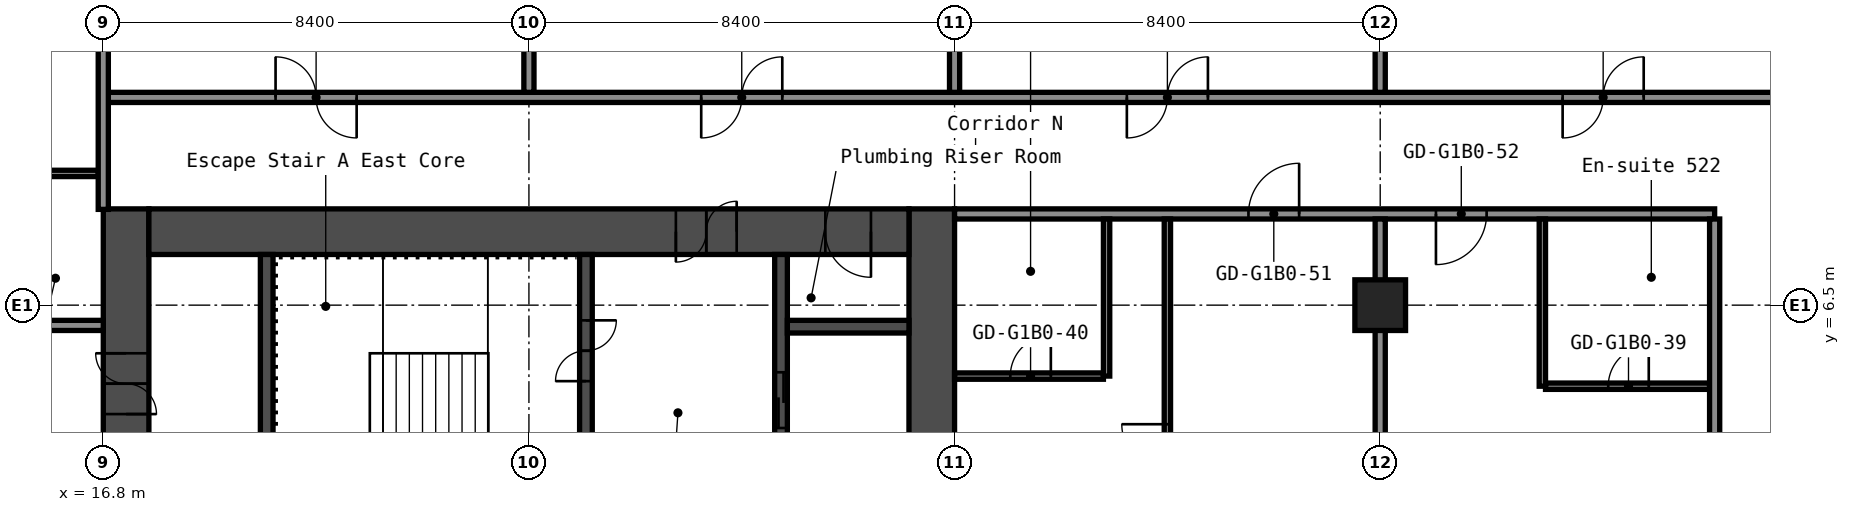
"""IFC4 building model, lengths in metres.
Left out: names, types, materials, properties, quantities, classifications, styles, units other than length and angle.
Written with IfcOpenShell. Run it as: python <this file> out.ifc"""

import sys

from ifc_helpers import new_model, si_unit, direction, frame, frame_2d, origin, origin_2d, place, context, subcontext, project, spatial, rectangle, hollow_rectangle, extrude, element, fill, save


model = new_model("IFC4")
c1 = context("Model", 3, precision=1e-05, world=origin(), true_north=direction((0.0, 1.0)))
c2 = subcontext(c1, "Body", "Model", "MODEL_VIEW")
j1 = project(units=[si_unit("LENGTHUNIT", "METRE"), si_unit("PLANEANGLEUNIT", "RADIAN")], contexts=[c1])
p1 = place(None, origin())
s1 = spatial("IfcSite", under=j1, at=p1, CompositionType="ELEMENT")
p2 = place(p1, origin())
s2 = spatial("IfcBuilding", under=s1, at=p2, CompositionType="ELEMENT")
p3 = place(p2, frame((0.0, 0.0, 23.0)))
s3 = spatial("IfcBuildingStorey", under=s2, at=p3, CompositionType="ELEMENT", Elevation=23.0)
p4 = place(p3, frame((42.0, 6.5, 0.0), z_axis=(0.0, 0.0, 1.0), x_axis=(1.0, 0.0, 0.0)))
e1 = element("IfcColumn", 1, at=p4, inside=s3, PredefinedType="COLUMN", context=c2, shape_type="SweptSolid", body=[
    extrude(hollow_rectangle(XDim=1.0, YDim=1.0, WallThickness=0.04, at=origin_2d()), origin(), (0.0, 0.0, 1.0), 2.8),
])
p5 = place(p3, frame((17.25, -8.4, 0.0), z_axis=(0.0, 0.0, 1.0), x_axis=(0.0, 1.0, 0.0)))
e2 = element("IfcWall", 2, at=p5, inside=s3, PredefinedType="SHEAR", context=c2, shape_type="SweptSolid", body=[
    extrude(rectangle(XDim=16.8, YDim=0.9, at=frame_2d((8.4, 0.0))), origin(), (0.0, 0.0, 1.0), 2.8),
])
p6 = place(p5, frame((12.75, 0.0, 0.0)))
e3 = element("IfcOpeningElement", 3, at=p6, cuts=e2, PredefinedType="OPENING", context=c2, shape_type="SweptSolid", body=[
    extrude(rectangle(XDim=1.2, YDim=2.1, at=frame_2d((0.6, 1.05))), frame((0.0, 0.46, 0.0), z_axis=(0.0, -1.0, 0.0), x_axis=(1.0, 0.0, 0.0)), (0.0, 0.0, 1.0), 0.92),
])
p7 = place(p5, frame((2.85, 0.0, 0.0)))
e4 = element("IfcOpeningElement", 4, at=p7, cuts=e2, PredefinedType="OPENING", context=c2, shape_type="SweptSolid", body=[
    extrude(rectangle(XDim=1.2, YDim=2.1, at=frame_2d((0.6, 1.05))), frame((0.0, 0.46, 0.0), z_axis=(0.0, -1.0, 0.0), x_axis=(1.0, 0.0, 0.0)), (0.0, 0.0, 1.0), 0.92),
])
p8 = place(p3, frame((33.15, -8.4, 0.0), z_axis=(0.0, 0.0, 1.0), x_axis=(0.0, 1.0, 0.0)))
e5 = element("IfcWall", 5, at=p8, inside=s3, PredefinedType="SHEAR", context=c2, shape_type="SweptSolid", body=[
    extrude(rectangle(XDim=16.8, YDim=0.9, at=frame_2d((8.4, 0.0))), origin(), (0.0, 0.0, 1.0), 2.8),
])
p9 = place(p3, frame((17.7, 7.95, 0.0), z_axis=(0.0, 0.0, 1.0), x_axis=(1.0, 0.0, 0.0)))
e6 = element("IfcWall", 6, at=p9, inside=s3, PredefinedType="SHEAR", context=c2, shape_type="SweptSolid", body=[
    extrude(rectangle(XDim=15.0, YDim=0.9, at=frame_2d((7.5, 0.0))), origin(), (0.0, 0.0, 1.0), 2.8),
])
p10 = place(p9, frame((10.4, 0.0, 0.0)))
e7 = element("IfcOpeningElement", 7, at=p10, cuts=e6, PredefinedType="OPENING", context=c2, shape_type="SweptSolid", body=[
    extrude(rectangle(XDim=1.2, YDim=2.1, at=frame_2d((0.6, 1.05))), frame((0.0, 0.46, 0.0), z_axis=(0.0, -1.0, 0.0), x_axis=(1.0, 0.0, 0.0)), (0.0, 0.0, 1.0), 0.92),
])
p11 = place(p9, frame((13.35, 0.0, 0.0)))
e8 = element("IfcOpeningElement", 8, at=p11, cuts=e6, PredefinedType="OPENING", context=c2, shape_type="SweptSolid", body=[
    extrude(rectangle(XDim=0.9, YDim=2.1, at=frame_2d((0.45, 1.05))), frame((0.0, 0.46, 0.0), z_axis=(0.0, -1.0, 0.0), x_axis=(1.0, 0.0, 0.0)), (0.0, 0.0, 1.0), 0.92),
])
p12 = place(p3, frame((20.025, 1.2, 0.0), z_axis=(0.0, 0.0, 1.0), x_axis=(0.0, 1.0, 0.0)))
e9 = element("IfcWall", 9, at=p12, inside=s3, PredefinedType="SHEAR", context=c2, shape_type="SweptSolid", body=[
    extrude(rectangle(XDim=6.3, YDim=0.25, at=frame_2d((3.15, 0.0))), origin(), (0.0, 0.0, 1.0), 2.8),
])
p13 = place(p3, frame((26.325, 3.75, 0.0), z_axis=(0.0, 0.0, 1.0), x_axis=(0.0, 1.0, 0.0)))
e10 = element("IfcWall", 10, at=p13, inside=s3, PredefinedType="SHEAR", context=c2, shape_type="SweptSolid", body=[
    extrude(rectangle(XDim=3.75, YDim=0.25, at=frame_2d((1.875, 0.0))), origin(), (0.0, 0.0, 1.0), 2.8),
])
p14 = place(p13, frame((1.25, 0.0, 0.0)))
e11 = element("IfcOpeningElement", 11, at=p14, cuts=e10, PredefinedType="OPENING", context=c2, shape_type="SweptSolid", body=[
    extrude(rectangle(XDim=1.2, YDim=2.1, at=frame_2d((0.6, 1.05))), frame((0.0, 0.135, 0.0), z_axis=(0.0, -1.0, 0.0), x_axis=(1.0, 0.0, 0.0)), (0.0, 0.0, 1.0), 0.27),
])
p15 = place(p3, frame((30.175, 1.45, 0.0), z_axis=(0.0, 0.0, 1.0), x_axis=(0.0, 1.0, 0.0)))
e12 = element("IfcWall", 12, at=p15, inside=s3, PredefinedType="SHEAR", context=c2, shape_type="SweptSolid", body=[
    extrude(rectangle(XDim=6.05, YDim=0.25, at=frame_2d((3.025, 0.0))), origin(), (0.0, 0.0, 1.0), 2.8),
])
p16 = place(p15, frame((2.625, 0.0, 0.0)))
e13 = element("IfcOpeningElement", 13, at=p16, cuts=e12, PredefinedType="OPENING", context=c2, shape_type="SweptSolid", body=[
    extrude(rectangle(XDim=1.1, YDim=2.1, at=frame_2d((0.55, 1.05))), frame((0.0, 0.135, 0.0), z_axis=(0.0, -1.0, 0.0), x_axis=(1.0, 0.0, 0.0)), (0.0, 0.0, 1.0), 0.27),
])
p17 = place(p3, frame((30.3, 6.075, 0.0), z_axis=(0.0, 0.0, 1.0), x_axis=(1.0, 0.0, 0.0)))
e14 = element("IfcWall", 14, at=p17, inside=s3, PredefinedType="SHEAR", context=c2, shape_type="SweptSolid", body=[
    extrude(rectangle(XDim=2.4, YDim=0.25, at=frame_2d((1.2, 0.0))), origin(), (0.0, 0.0, 1.0), 2.8),
])
p18 = place(p3, frame((45.262, 4.9, 0.0), z_axis=(0.0, 0.0, 1.0), x_axis=(1.0, 0.0, 0.0)))
e15 = element("IfcWall", 15, at=p18, inside=s3, PredefinedType="PARTITIONING", context=c2, shape_type="SweptSolid", body=[
    extrude(rectangle(XDim=3.238, YDim=0.125, at=frame_2d((1.619, 0.0))), origin(), (0.0, 0.0, 1.0), 2.8),
])
p19 = place(p18, frame((1.238, 0.0, 0.0)))
e16 = element("IfcOpeningElement", 16, at=p19, cuts=e15, PredefinedType="OPENING", context=c2, shape_type="SweptSolid", body=[
    extrude(rectangle(XDim=0.8, YDim=2.1, at=frame_2d((0.4, 1.05))), frame((0.0, 0.073, 0.0), z_axis=(0.0, -1.0, 0.0), x_axis=(1.0, 0.0, 0.0)), (0.0, 0.0, 1.0), 0.145),
])
p20 = place(p3, frame((33.6, 5.1, 0.0), z_axis=(0.0, 0.0, 1.0), x_axis=(1.0, 0.0, 0.0)))
e17 = element("IfcWall", 17, at=p20, inside=s3, PredefinedType="PARTITIONING", context=c2, shape_type="SweptSolid", body=[
    extrude(rectangle(XDim=2.938, YDim=0.125, at=frame_2d((1.469, 0.0))), origin(), (0.0, 0.0, 1.0), 2.8),
])
p21 = place(p20, frame((1.1, 0.0, 0.0)))
e18 = element("IfcOpeningElement", 18, at=p21, cuts=e17, PredefinedType="OPENING", context=c2, shape_type="SweptSolid", body=[
    extrude(rectangle(XDim=0.8, YDim=2.1, at=frame_2d((0.4, 1.05))), frame((0.0, 0.073, 0.0), z_axis=(0.0, -1.0, 0.0), x_axis=(1.0, 0.0, 0.0)), (0.0, 0.0, 1.0), 0.145),
])
p22 = place(p3, frame((-16.8, 6.1, 0.0), z_axis=(0.0, 0.0, 1.0), x_axis=(1.0, 0.0, 0.0)))
e19 = element("IfcWall", 19, at=p22, inside=s3, PredefinedType="PARTITIONING", context=c2, shape_type="SweptSolid", body=[
    extrude(rectangle(XDim=33.6, YDim=0.2, at=frame_2d((16.8, 0.0))), origin(), (0.0, 0.0, 1.0), 2.8),
])
p23 = place(p22, frame((2.85, 0.0, 0.0)))
e20 = element("IfcOpeningElement", 20, at=p23, cuts=e19, PredefinedType="OPENING", context=c2, shape_type="SweptSolid", body=[
    extrude(rectangle(XDim=1.0, YDim=2.1, at=frame_2d((0.5, 1.05))), frame((0.0, 0.11, 0.0), z_axis=(0.0, -1.0, 0.0), x_axis=(1.0, 0.0, 0.0)), (0.0, 0.0, 1.0), 0.22),
])
p24 = place(p22, frame((4.55, 0.0, 0.0)))
e21 = element("IfcOpeningElement", 21, at=p24, cuts=e19, PredefinedType="OPENING", context=c2, shape_type="SweptSolid", body=[
    extrude(rectangle(XDim=1.0, YDim=2.1, at=frame_2d((0.5, 1.05))), frame((0.0, 0.11, 0.0), z_axis=(0.0, -1.0, 0.0), x_axis=(1.0, 0.0, 0.0)), (0.0, 0.0, 1.0), 0.22),
])
p25 = place(p22, frame((9.545, 0.0, 0.0)))
e22 = element("IfcOpeningElement", 22, at=p25, cuts=e19, PredefinedType="OPENING", context=c2, shape_type="SweptSolid", body=[
    extrude(rectangle(XDim=0.9, YDim=2.1, at=frame_2d((0.45, 1.05))), frame((0.0, 0.11, 0.0), z_axis=(0.0, -1.0, 0.0), x_axis=(1.0, 0.0, 0.0)), (0.0, 0.0, 1.0), 0.22),
])
p26 = place(p22, frame((13.745, 0.0, 0.0)))
e23 = element("IfcOpeningElement", 23, at=p26, cuts=e19, PredefinedType="OPENING", context=c2, shape_type="SweptSolid", body=[
    extrude(rectangle(XDim=0.9, YDim=2.1, at=frame_2d((0.45, 1.05))), frame((0.0, 0.11, 0.0), z_axis=(0.0, -1.0, 0.0), x_axis=(1.0, 0.0, 0.0)), (0.0, 0.0, 1.0), 0.22),
])
p27 = place(p22, frame((19.65, 0.0, 0.0)))
e24 = element("IfcOpeningElement", 24, at=p27, cuts=e19, PredefinedType="OPENING", context=c2, shape_type="SweptSolid", body=[
    extrude(rectangle(XDim=1.0, YDim=2.1, at=frame_2d((0.5, 1.05))), frame((0.0, 0.11, 0.0), z_axis=(0.0, -1.0, 0.0), x_axis=(1.0, 0.0, 0.0)), (0.0, 0.0, 1.0), 0.22),
])
p28 = place(p22, frame((21.35, 0.0, 0.0)))
e25 = element("IfcOpeningElement", 25, at=p28, cuts=e19, PredefinedType="OPENING", context=c2, shape_type="SweptSolid", body=[
    extrude(rectangle(XDim=1.0, YDim=2.1, at=frame_2d((0.5, 1.05))), frame((0.0, 0.11, 0.0), z_axis=(0.0, -1.0, 0.0), x_axis=(1.0, 0.0, 0.0)), (0.0, 0.0, 1.0), 0.22),
])
p29 = place(p22, frame((28.05, 0.0, 0.0)))
e26 = element("IfcOpeningElement", 26, at=p29, cuts=e19, PredefinedType="OPENING", context=c2, shape_type="SweptSolid", body=[
    extrude(rectangle(XDim=1.0, YDim=2.1, at=frame_2d((0.5, 1.05))), frame((0.0, 0.11, 0.0), z_axis=(0.0, -1.0, 0.0), x_axis=(1.0, 0.0, 0.0)), (0.0, 0.0, 1.0), 0.22),
])
p30 = place(p22, frame((29.75, 0.0, 0.0)))
e27 = element("IfcOpeningElement", 27, at=p30, cuts=e19, PredefinedType="OPENING", context=c2, shape_type="SweptSolid", body=[
    extrude(rectangle(XDim=1.0, YDim=2.1, at=frame_2d((0.5, 1.05))), frame((0.0, 0.11, 0.0), z_axis=(0.0, -1.0, 0.0), x_axis=(1.0, 0.0, 0.0)), (0.0, 0.0, 1.0), 0.22),
])
p31 = place(p3, frame((33.6, 8.3, 0.0), z_axis=(0.0, 0.0, 1.0), x_axis=(1.0, 0.0, 0.0)))
e28 = element("IfcWall", 28, at=p31, inside=s3, PredefinedType="PARTITIONING", context=c2, shape_type="SweptSolid", body=[
    extrude(rectangle(XDim=15.0, YDim=0.2, at=frame_2d((7.5, 0.0))), origin(), (0.0, 0.0, 1.0), 2.8),
])
p32 = place(p31, frame((5.8, 0.0, 0.0)))
e29 = element("IfcOpeningElement", 29, at=p32, cuts=e28, PredefinedType="OPENING", context=c2, shape_type="SweptSolid", body=[
    extrude(rectangle(XDim=1.0, YDim=2.1, at=frame_2d((0.5, 1.05))), frame((0.0, 0.11, 0.0), z_axis=(0.0, -1.0, 0.0), x_axis=(1.0, 0.0, 0.0)), (0.0, 0.0, 1.0), 0.22),
])
p33 = place(p31, frame((9.5, 0.0, 0.0)))
e30 = element("IfcOpeningElement", 30, at=p33, cuts=e28, PredefinedType="OPENING", context=c2, shape_type="SweptSolid", body=[
    extrude(rectangle(XDim=1.0, YDim=2.1, at=frame_2d((0.5, 1.05))), frame((0.0, 0.11, 0.0), z_axis=(0.0, -1.0, 0.0), x_axis=(1.0, 0.0, 0.0)), (0.0, 0.0, 1.0), 0.22),
])
p34 = place(p3, frame((14.363, 9.1, 0.0), z_axis=(0.0, 0.0, 1.0), x_axis=(1.0, 0.0, 0.0)))
e31 = element("IfcWall", 31, at=p34, inside=s3, PredefinedType="PARTITIONING", context=c2, shape_type="SweptSolid", body=[
    extrude(rectangle(XDim=2.337, YDim=0.125, at=frame_2d((1.169, 0.0))), origin(), (0.0, 0.0, 1.0), 2.8),
])
p35 = place(p3, frame((16.8, 10.6, 0.0), z_axis=(0.0, 0.0, 1.0), x_axis=(1.0, 0.0, 0.0)))
e32 = element("IfcWall", 32, at=p35, inside=s3, PredefinedType="PARTITIONING", context=c2, shape_type="SweptSolid", body=[
    extrude(rectangle(XDim=34.3, YDim=0.2, at=frame_2d((17.15, 0.0))), origin(), (0.0, 0.0, 1.0), 2.8),
])
p36 = place(p35, frame((3.4, 0.0, 0.0)))
e33 = element("IfcOpeningElement", 33, at=p36, cuts=e32, PredefinedType="OPENING", context=c2, shape_type="SweptSolid", body=[
    extrude(rectangle(XDim=1.6, YDim=2.1, at=frame_2d((0.8, 1.05))), frame((0.0, 0.11, 0.0), z_axis=(0.0, -1.0, 0.0), x_axis=(1.0, 0.0, 0.0)), (0.0, 0.0, 1.0), 0.22),
])
p37 = place(p35, frame((11.8, 0.0, 0.0)))
e34 = element("IfcOpeningElement", 34, at=p37, cuts=e32, PredefinedType="OPENING", context=c2, shape_type="SweptSolid", body=[
    extrude(rectangle(XDim=1.6, YDim=2.1, at=frame_2d((0.8, 1.05))), frame((0.0, 0.11, 0.0), z_axis=(0.0, -1.0, 0.0), x_axis=(1.0, 0.0, 0.0)), (0.0, 0.0, 1.0), 0.22),
])
p38 = place(p35, frame((20.2, 0.0, 0.0)))
e35 = element("IfcOpeningElement", 35, at=p38, cuts=e32, PredefinedType="OPENING", context=c2, shape_type="SweptSolid", body=[
    extrude(rectangle(XDim=1.6, YDim=2.1, at=frame_2d((0.8, 1.05))), frame((0.0, 0.11, 0.0), z_axis=(0.0, -1.0, 0.0), x_axis=(1.0, 0.0, 0.0)), (0.0, 0.0, 1.0), 0.22),
])
p39 = place(p35, frame((28.8, 0.0, 0.0)))
e36 = element("IfcOpeningElement", 36, at=p39, cuts=e32, PredefinedType="OPENING", context=c2, shape_type="SweptSolid", body=[
    extrude(rectangle(XDim=1.6, YDim=2.1, at=frame_2d((0.8, 1.05))), frame((0.0, 0.11, 0.0), z_axis=(0.0, -1.0, 0.0), x_axis=(1.0, 0.0, 0.0)), (0.0, 0.0, 1.0), 0.22),
])
p40 = place(p3, frame((16.8, 8.39, 0.0), z_axis=(0.0, 0.0, 1.0), x_axis=(0.0, 1.0, 0.0)))
e37 = element("IfcWall", 37, at=p40, inside=s3, PredefinedType="PARTITIONING", context=c2, shape_type="SweptSolid", body=[
    extrude(rectangle(XDim=11.91, YDim=0.2, at=frame_2d((5.955, 0.0))), origin(), (0.0, 0.0, 1.0), 2.8),
])
for number, where, z_axis, x_axis in (
    (38, (25.2, 10.7, 0.0), (0.0, 0.0, 1.0), (0.0, 1.0, 0.0)),
    (39, (33.6, 10.7, 0.0), (0.0, 0.0, 1.0), (0.0, 1.0, 0.0)),
):
    element("IfcWall", number, at=place(p3, frame(where, z_axis=z_axis, x_axis=x_axis)), inside=s3, PredefinedType="PARTITIONING", context=c2, shape_type="SweptSolid", body=[
        extrude(rectangle(XDim=9.6, YDim=0.2, at=frame_2d((4.8, 0.0))), origin(), (0.0, 0.0, 1.0), 2.8),
    ])
p41 = place(p3, frame((36.6, 5.1, 0.0), z_axis=(0.0, 0.0, 1.0), x_axis=(0.0, 1.0, 0.0)))
e40 = element("IfcWall", 40, at=p41, inside=s3, PredefinedType="PARTITIONING", context=c2, shape_type="SweptSolid", body=[
    extrude(rectangle(XDim=3.1, YDim=0.125, at=frame_2d((1.55, 0.0))), origin(), (0.0, 0.0, 1.0), 2.8),
])
p42 = place(p3, frame((37.8, 0.1, 0.0), z_axis=(0.0, 0.0, 1.0), x_axis=(0.0, 1.0, 0.0)))
e41 = element("IfcWall", 41, at=p42, inside=s3, PredefinedType="PARTITIONING", context=c2, shape_type="SweptSolid", body=[
    extrude(rectangle(XDim=8.1, YDim=0.125, at=frame_2d((4.05, 0.0))), origin(), (0.0, 0.0, 1.0), 2.8),
])
p43 = place(p42, frame((3.15, 0.0, 0.0)))
e42 = element("IfcOpeningElement", 42, at=p43, cuts=e41, PredefinedType="OPENING", context=c2, shape_type="SweptSolid", body=[
    extrude(rectangle(XDim=0.9, YDim=2.1, at=frame_2d((0.45, 1.05))), frame((0.0, 0.073, 0.0), z_axis=(0.0, -1.0, 0.0), x_axis=(1.0, 0.0, 0.0)), (0.0, 0.0, 1.0), 0.145),
])
p44 = place(p3, frame((42.0, 0.0, 0.0), z_axis=(0.0, 0.0, 1.0), x_axis=(0.0, 1.0, 0.0)))
e43 = element("IfcWall", 43, at=p44, inside=s3, PredefinedType="PARTITIONING", context=c2, shape_type="SweptSolid", body=[
    extrude(rectangle(XDim=8.2, YDim=0.2, at=frame_2d((4.1, 0.0))), origin(), (0.0, 0.0, 1.0), 2.8),
])
p45 = place(p3, frame((42.0, 10.7, 0.0), z_axis=(0.0, 0.0, 1.0), x_axis=(0.0, 1.0, 0.0)))
e44 = element("IfcWall", 44, at=p45, inside=s3, PredefinedType="PARTITIONING", context=c2, shape_type="SweptSolid", body=[
    extrude(rectangle(XDim=9.6, YDim=0.2, at=frame_2d((4.8, 0.0))), origin(), (0.0, 0.0, 1.0), 2.8),
])
p46 = place(p3, frame((45.2, 4.9, 0.0), z_axis=(0.0, 0.0, 1.0), x_axis=(0.0, 1.0, 0.0)))
e45 = element("IfcWall", 45, at=p46, inside=s3, PredefinedType="PARTITIONING", context=c2, shape_type="SweptSolid", body=[
    extrude(rectangle(XDim=3.3, YDim=0.125, at=frame_2d((1.65, 0.0))), origin(), (0.0, 0.0, 1.0), 2.8),
])
p47 = place(p3, frame((48.6, -8.2, 0.0), z_axis=(0.0, 0.0, 1.0), x_axis=(0.0, 1.0, 0.0)))
e46 = element("IfcWall", 46, at=p47, inside=s3, PredefinedType="PARTITIONING", context=c2, shape_type="SweptSolid", body=[
    extrude(rectangle(XDim=16.4, YDim=0.2, at=frame_2d((8.2, 0.0))), origin(), (0.0, 0.0, 1.0), 2.8),
])
p48 = place(p6, origin())
e47 = element("IfcDoor", 47, at=p48, inside=s3, OperationType="DOUBLE_DOOR_SINGLE_SWING", PredefinedType="DOOR", context=c2, shape_type="SweptSolid", body=[
    extrude(rectangle(XDim=1.2, YDim=2.1, at=frame_2d((0.6, 1.05))), frame((0.0, 0.025, 0.0), z_axis=(0.0, -1.0, 0.0), x_axis=(1.0, 0.0, 0.0)), (0.0, 0.0, 1.0), 0.05),
])
fill(e3, e47)
p49 = place(p10, origin())
e48 = element("IfcDoor", 48, at=p49, inside=s3, OperationType="DOUBLE_DOOR_SINGLE_SWING", PredefinedType="DOOR", context=c2, shape_type="SweptSolid", body=[
    extrude(rectangle(XDim=1.2, YDim=2.1, at=frame_2d((0.6, 1.05))), frame((0.0, 0.025, 0.0), z_axis=(0.0, -1.0, 0.0), x_axis=(1.0, 0.0, 0.0)), (0.0, 0.0, 1.0), 0.05),
])
fill(e7, e48)
p50 = place(p11, origin())
e49 = element("IfcDoor", 49, at=p50, inside=s3, OperationType="SINGLE_SWING_RIGHT", PredefinedType="DOOR", context=c2, shape_type="SweptSolid", body=[
    extrude(rectangle(XDim=0.9, YDim=2.1, at=frame_2d((0.45, 1.05))), frame((0.0, 0.025, 0.0), z_axis=(0.0, -1.0, 0.0), x_axis=(1.0, 0.0, 0.0)), (0.0, 0.0, 1.0), 0.05),
])
fill(e8, e49)
p51 = place(p14, origin())
e50 = element("IfcDoor", 50, at=p51, inside=s3, OperationType="DOUBLE_DOOR_SINGLE_SWING", PredefinedType="DOOR", context=c2, shape_type="SweptSolid", body=[
    extrude(rectangle(XDim=1.2, YDim=2.1, at=frame_2d((0.6, 1.05))), frame((0.0, 0.025, 0.0), z_axis=(0.0, -1.0, 0.0), x_axis=(1.0, 0.0, 0.0)), (0.0, 0.0, 1.0), 0.05),
])
fill(e11, e50)
p52 = place(p16, origin())
e51 = element("IfcDoor", 51, at=p52, inside=s3, OperationType="DOUBLE_DOOR_SLIDING", PredefinedType="DOOR", context=c2, shape_type="SweptSolid", body=[
    extrude(rectangle(XDim=1.1, YDim=2.1, at=frame_2d((0.55, 1.05))), frame((0.0, 0.025, 0.0), z_axis=(0.0, -1.0, 0.0), x_axis=(1.0, 0.0, 0.0)), (0.0, 0.0, 1.0), 0.05),
])
fill(e13, e51)
p53 = place(p19, origin())
e52 = element("IfcDoor", 52, at=p53, inside=s3, OperationType="SINGLE_SWING_LEFT", PredefinedType="DOOR", context=c2, shape_type="SweptSolid", body=[
    extrude(rectangle(XDim=0.8, YDim=2.1, at=frame_2d((0.4, 1.05))), frame((0.0, 0.025, 0.0), z_axis=(0.0, -1.0, 0.0), x_axis=(1.0, 0.0, 0.0)), (0.0, 0.0, 1.0), 0.05),
])
fill(e16, e52)
p54 = place(p21, origin())
e53 = element("IfcDoor", 53, at=p54, inside=s3, OperationType="SINGLE_SWING_LEFT", PredefinedType="DOOR", context=c2, shape_type="SweptSolid", body=[
    extrude(rectangle(XDim=0.8, YDim=2.1, at=frame_2d((0.4, 1.05))), frame((0.0, 0.025, 0.0), z_axis=(0.0, -1.0, 0.0), x_axis=(1.0, 0.0, 0.0)), (0.0, 0.0, 1.0), 0.05),
])
fill(e18, e53)
p55 = place(p32, origin())
e54 = element("IfcDoor", 54, at=p55, inside=s3, OperationType="SINGLE_SWING_LEFT", PredefinedType="DOOR", context=c2, shape_type="SweptSolid", body=[
    extrude(rectangle(XDim=1.0, YDim=2.1, at=frame_2d((0.5, 1.05))), frame((0.0, 0.025, 0.0), z_axis=(0.0, -1.0, 0.0), x_axis=(1.0, 0.0, 0.0)), (0.0, 0.0, 1.0), 0.05),
])
fill(e29, e54)
p56 = place(p33, origin())
e55 = element("IfcDoor", 55, at=p56, inside=s3, OperationType="SINGLE_SWING_LEFT", PredefinedType="DOOR", context=c2, shape_type="SweptSolid", body=[
    extrude(rectangle(XDim=1.0, YDim=2.1, at=frame_2d((0.5, 1.05))), frame((0.0, 0.025, 0.0), z_axis=(0.0, -1.0, 0.0), x_axis=(1.0, 0.0, 0.0)), (0.0, 0.0, 1.0), 0.05),
])
fill(e30, e55)
p57 = place(p36, origin())
e56 = element("IfcDoor", 56, at=p57, inside=s3, OperationType="DOUBLE_DOOR_SINGLE_SWING", PredefinedType="DOOR", context=c2, shape_type="SweptSolid", body=[
    extrude(rectangle(XDim=1.6, YDim=2.1, at=frame_2d((0.8, 1.05))), frame((0.0, 0.025, 0.0), z_axis=(0.0, -1.0, 0.0), x_axis=(1.0, 0.0, 0.0)), (0.0, 0.0, 1.0), 0.05),
])
fill(e33, e56)
p58 = place(p37, origin())
e57 = element("IfcDoor", 57, at=p58, inside=s3, OperationType="DOUBLE_DOOR_SINGLE_SWING", PredefinedType="DOOR", context=c2, shape_type="SweptSolid", body=[
    extrude(rectangle(XDim=1.6, YDim=2.1, at=frame_2d((0.8, 1.05))), frame((0.0, 0.025, 0.0), z_axis=(0.0, -1.0, 0.0), x_axis=(1.0, 0.0, 0.0)), (0.0, 0.0, 1.0), 0.05),
])
fill(e34, e57)
p59 = place(p38, origin())
e58 = element("IfcDoor", 58, at=p59, inside=s3, OperationType="DOUBLE_DOOR_SINGLE_SWING", PredefinedType="DOOR", context=c2, shape_type="SweptSolid", body=[
    extrude(rectangle(XDim=1.6, YDim=2.1, at=frame_2d((0.8, 1.05))), frame((0.0, 0.025, 0.0), z_axis=(0.0, -1.0, 0.0), x_axis=(1.0, 0.0, 0.0)), (0.0, 0.0, 1.0), 0.05),
])
fill(e35, e58)
p60 = place(p39, origin())
e59 = element("IfcDoor", 59, at=p60, inside=s3, OperationType="DOUBLE_DOOR_SINGLE_SWING", PredefinedType="DOOR", context=c2, shape_type="SweptSolid", body=[
    extrude(rectangle(XDim=1.6, YDim=2.1, at=frame_2d((0.8, 1.05))), frame((0.0, 0.025, 0.0), z_axis=(0.0, -1.0, 0.0), x_axis=(1.0, 0.0, 0.0)), (0.0, 0.0, 1.0), 0.05),
])
fill(e36, e59)
p61 = place(p43, origin())
e60 = element("IfcDoor", 60, at=p61, inside=s3, OperationType="SINGLE_SWING_LEFT", PredefinedType="DOOR", context=c2, shape_type="SweptSolid", body=[
    extrude(rectangle(XDim=0.9, YDim=2.1, at=frame_2d((0.45, 1.05))), frame((0.0, 0.025, 0.0), z_axis=(0.0, -1.0, 0.0), x_axis=(1.0, 0.0, 0.0)), (0.0, 0.0, 1.0), 0.05),
])
fill(e42, e60)
save(model, sys.argv[1])
